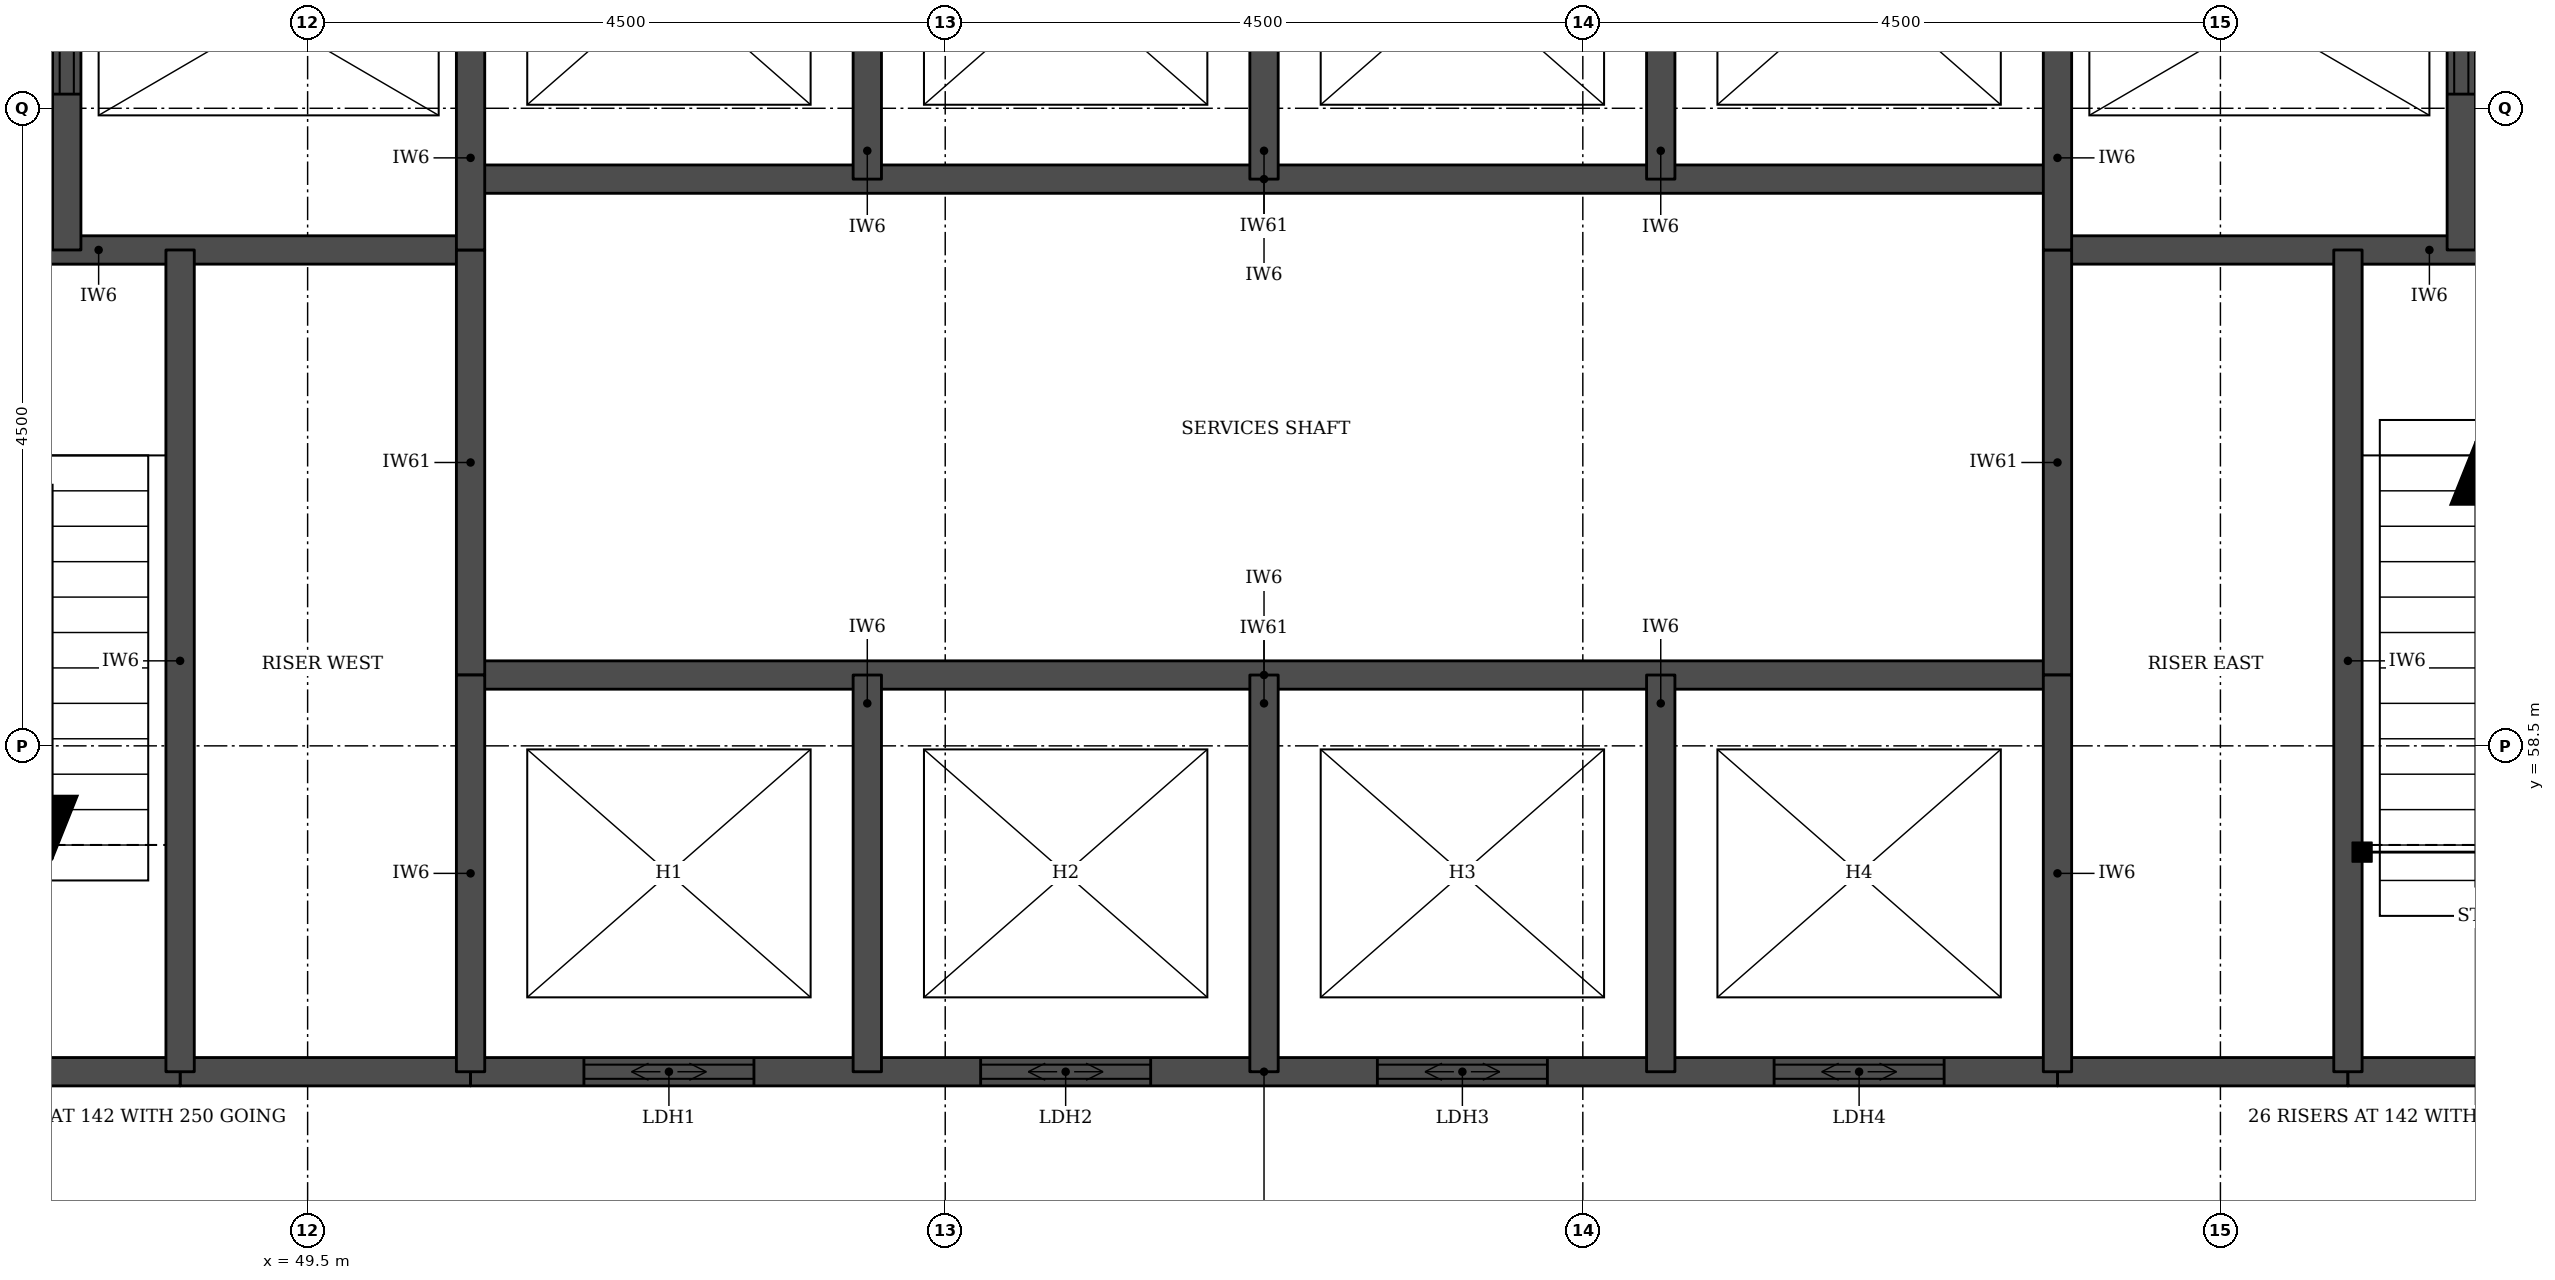
"""IFC4 building model, lengths in metres.
Left out: names, types, materials, properties, quantities, classifications, styles, units other than length and angle.
Written with IfcOpenShell. Run it as: python <this file> out.ifc"""

import sys

from ifc_helpers import new_model, si_unit, direction, frame, frame_2d, origin, place, context, subcontext, project, spatial, rectangle, extrude, element, fill, save


model = new_model("IFC4")
c1 = context("Model", 3, precision=1e-05, world=origin(), true_north=direction((0.0, 1.0)))
c2 = subcontext(c1, "Body", "Model", "MODEL_VIEW")
j1 = project(units=[si_unit("LENGTHUNIT", "METRE"), si_unit("PLANEANGLEUNIT", "RADIAN")], contexts=[c1])
p1 = place(None, origin())
s1 = spatial("IfcSite", under=j1, at=p1, CompositionType="ELEMENT")
p2 = place(p1, origin())
s2 = spatial("IfcBuilding", under=s1, at=p2, CompositionType="ELEMENT")
p3 = place(p2, frame((0.0, 0.0, 248.9)))
s3 = spatial("IfcBuildingStorey", under=s2, at=p3, CompositionType="ELEMENT", Elevation=248.9)
for number, where, z_axis, x_axis in (
    (1, (48.6, 56.2, 0.0), (0.0, 0.0, 1.0), (1.0, 0.0, 0.0)),
    (2, (61.85, 56.2, 0.0), (0.0, 0.0, 1.0), (1.0, 0.0, 0.0)),
):
    element("IfcWall", number, at=place(p3, frame(where, z_axis=z_axis, x_axis=x_axis)), inside=s3, PredefinedType="SOLIDWALL", context=c2, shape_type="SweptSolid", body=[
        extrude(rectangle(XDim=2.05, YDim=0.2, at=frame_2d((1.025, 0.0))), origin(), (0.0, 0.0, 1.0), 3.55),
    ])
p4 = place(p3, frame((45.4, 56.2, 0.0), z_axis=(0.0, 0.0, 1.0), x_axis=(1.0, 0.0, 0.0)))
e3 = element("IfcWall", 3, at=p4, inside=s3, PredefinedType="SOLIDWALL", context=c2, shape_type="SweptSolid", body=[
    extrude(rectangle(XDim=3.2, YDim=0.2, at=frame_2d((1.6, 0.0))), origin(), (0.0, 0.0, 1.0), 3.55),
])
p5 = place(p3, frame((50.65, 56.2, 0.0), z_axis=(0.0, 0.0, 1.0), x_axis=(1.0, 0.0, 0.0)))
e4 = element("IfcWall", 4, at=p5, inside=s3, PredefinedType="SOLIDWALL", context=c2, shape_type="SweptSolid", body=[
    extrude(rectangle(XDim=11.2, YDim=0.2, at=frame_2d((5.6, 0.0))), origin(), (0.0, 0.0, 1.0), 3.55),
])
p6 = place(p5, frame((0.8, 0.0, 0.0)))
e5 = element("IfcOpeningElement", 5, at=p6, cuts=e4, PredefinedType="OPENING", context=c2, shape_type="SweptSolid", body=[
    extrude(rectangle(XDim=1.2, YDim=2.1, at=frame_2d((0.6, 1.05))), frame((0.0, 0.11, 0.0), z_axis=(0.0, -1.0, 0.0), x_axis=(1.0, 0.0, 0.0)), (0.0, 0.0, 1.0), 0.22),
])
p7 = place(p5, frame((3.6, 0.0, 0.0)))
e6 = element("IfcOpeningElement", 6, at=p7, cuts=e4, PredefinedType="OPENING", context=c2, shape_type="SweptSolid", body=[
    extrude(rectangle(XDim=1.2, YDim=2.1, at=frame_2d((0.6, 1.05))), frame((0.0, 0.11, 0.0), z_axis=(0.0, -1.0, 0.0), x_axis=(1.0, 0.0, 0.0)), (0.0, 0.0, 1.0), 0.22),
])
p8 = place(p5, frame((6.4, 0.0, 0.0)))
e7 = element("IfcOpeningElement", 7, at=p8, cuts=e4, PredefinedType="OPENING", context=c2, shape_type="SweptSolid", body=[
    extrude(rectangle(XDim=1.2, YDim=2.1, at=frame_2d((0.6, 1.05))), frame((0.0, 0.11, 0.0), z_axis=(0.0, -1.0, 0.0), x_axis=(1.0, 0.0, 0.0)), (0.0, 0.0, 1.0), 0.22),
])
p9 = place(p5, frame((9.2, 0.0, 0.0)))
e8 = element("IfcOpeningElement", 8, at=p9, cuts=e4, PredefinedType="OPENING", context=c2, shape_type="SweptSolid", body=[
    extrude(rectangle(XDim=1.2, YDim=2.1, at=frame_2d((0.6, 1.05))), frame((0.0, 0.11, 0.0), z_axis=(0.0, -1.0, 0.0), x_axis=(1.0, 0.0, 0.0)), (0.0, 0.0, 1.0), 0.22),
])
p10 = place(p3, frame((63.9, 56.2, 0.0), z_axis=(0.0, 0.0, 1.0), x_axis=(1.0, 0.0, 0.0)))
e9 = element("IfcWall", 9, at=p10, inside=s3, PredefinedType="SOLIDWALL", context=c2, shape_type="SweptSolid", body=[
    extrude(rectangle(XDim=3.2, YDim=0.2, at=frame_2d((1.6, 0.0))), origin(), (0.0, 0.0, 1.0), 3.55),
])
p11 = place(p3, frame((50.65, 59.0, 0.0), z_axis=(0.0, 0.0, 1.0), x_axis=(1.0, 0.0, 0.0)))
e10 = element("IfcWall", 10, at=p11, inside=s3, PredefinedType="SOLIDWALL", context=c2, shape_type="SweptSolid", body=[
    extrude(rectangle(XDim=11.2, YDim=0.2, at=frame_2d((5.6, 0.0))), origin(), (0.0, 0.0, 1.0), 3.7),
])
for number, where, z_axis, x_axis in (
    (11, (45.4, 62.0, 0.0), (0.0, 0.0, 1.0), (1.0, 0.0, 0.0)),
    (12, (61.85, 62.0, 0.0), (0.0, 0.0, 1.0), (1.0, 0.0, 0.0)),
):
    element("IfcWall", number, at=place(p3, frame(where, z_axis=z_axis, x_axis=x_axis)), inside=s3, PredefinedType="SOLIDWALL", context=c2, shape_type="SweptSolid", body=[
        extrude(rectangle(XDim=5.25, YDim=0.2, at=frame_2d((2.625, 0.0))), origin(), (0.0, 0.0, 1.0), 3.55),
    ])
p12 = place(p3, frame((50.65, 62.5, 0.0), z_axis=(0.0, 0.0, 1.0), x_axis=(1.0, 0.0, 0.0)))
e13 = element("IfcWall", 13, at=p12, inside=s3, PredefinedType="SOLIDWALL", context=c2, shape_type="SweptSolid", body=[
    extrude(rectangle(XDim=11.2, YDim=0.2, at=frame_2d((5.6, 0.0))), origin(), (0.0, 0.0, 1.0), 3.7),
])
p13 = place(p3, frame((47.8, 62.0, 0.0), z_axis=(0.0, 0.0, 1.0), x_axis=(0.0, 1.0, 0.0)))
e14 = element("IfcWall", 14, at=p13, inside=s3, PredefinedType="SOLIDWALL", context=c2, shape_type="SweptSolid", body=[
    extrude(rectangle(XDim=3.3, YDim=0.2, at=frame_2d((1.65, 0.0))), origin(), (0.0, 0.0, 1.0), 3.55),
])
p14 = place(p13, frame((1.1, 0.0, 0.0)))
e15 = element("IfcOpeningElement", 15, at=p14, cuts=e14, PredefinedType="OPENING", context=c2, shape_type="SweptSolid", body=[
    extrude(rectangle(XDim=1.1, YDim=2.1, at=frame_2d((0.55, 1.05))), frame((0.0, 0.11, 0.0), z_axis=(0.0, -1.0, 0.0), x_axis=(1.0, 0.0, 0.0)), (0.0, 0.0, 1.0), 0.22),
])
p15 = place(p3, frame((48.6, 56.2, 0.0), z_axis=(0.0, 0.0, 1.0), x_axis=(0.0, 1.0, 0.0)))
e16 = element("IfcWall", 16, at=p15, inside=s3, PredefinedType="SOLIDWALL", context=c2, shape_type="SweptSolid", body=[
    extrude(rectangle(XDim=5.8, YDim=0.2, at=frame_2d((2.9, 0.0))), origin(), (0.0, 0.0, 1.0), 3.55),
])
p16 = place(p3, frame((50.65, 59.0, 0.0), z_axis=(0.0, 0.0, 1.0), x_axis=(0.0, 1.0, 0.0)))
e17 = element("IfcWall", 17, at=p16, inside=s3, PredefinedType="SOLIDWALL", context=c2, shape_type="SweptSolid", body=[
    extrude(rectangle(XDim=3.0, YDim=0.2, at=frame_2d((1.5, 0.0))), origin(), (0.0, 0.0, 1.0), 3.7),
])
p17 = place(p3, frame((50.65, 56.2, 0.0), z_axis=(0.0, 0.0, 1.0), x_axis=(0.0, 1.0, 0.0)))
e18 = element("IfcWall", 18, at=p17, inside=s3, PredefinedType="SOLIDWALL", context=c2, shape_type="SweptSolid", body=[
    extrude(rectangle(XDim=2.8, YDim=0.2, at=frame_2d((1.4, 0.0))), origin(), (0.0, 0.0, 1.0), 3.55),
])
p18 = place(p3, frame((50.65, 62.0, 0.0), z_axis=(0.0, 0.0, 1.0), x_axis=(0.0, 1.0, 0.0)))
e19 = element("IfcWall", 19, at=p18, inside=s3, PredefinedType="SOLIDWALL", context=c2, shape_type="SweptSolid", body=[
    extrude(rectangle(XDim=3.3, YDim=0.2, at=frame_2d((1.65, 0.0))), origin(), (0.0, 0.0, 1.0), 3.55),
])
for number, where, z_axis, x_axis in (
    (20, (53.45, 56.2, 0.0), (0.0, 0.0, 1.0), (0.0, 1.0, 0.0)),
    (21, (53.45, 62.5, 0.0), (0.0, 0.0, 1.0), (0.0, 1.0, 0.0)),
    (22, (56.25, 56.2, 0.0), (0.0, 0.0, 1.0), (0.0, 1.0, 0.0)),
    (23, (56.25, 62.5, 0.0), (0.0, 0.0, 1.0), (0.0, 1.0, 0.0)),
    (24, (59.05, 56.2, 0.0), (0.0, 0.0, 1.0), (0.0, 1.0, 0.0)),
    (25, (59.05, 62.5, 0.0), (0.0, 0.0, 1.0), (0.0, 1.0, 0.0)),
):
    element("IfcWall", number, at=place(p3, frame(where, z_axis=z_axis, x_axis=x_axis)), inside=s3, PredefinedType="SOLIDWALL", context=c2, shape_type="SweptSolid", body=[
        extrude(rectangle(XDim=2.8, YDim=0.2, at=frame_2d((1.4, 0.0))), origin(), (0.0, 0.0, 1.0), 3.55),
    ])
p19 = place(p3, frame((61.85, 59.0, 0.0), z_axis=(0.0, 0.0, 1.0), x_axis=(0.0, 1.0, 0.0)))
e26 = element("IfcWall", 26, at=p19, inside=s3, PredefinedType="SOLIDWALL", context=c2, shape_type="SweptSolid", body=[
    extrude(rectangle(XDim=3.0, YDim=0.2, at=frame_2d((1.5, 0.0))), origin(), (0.0, 0.0, 1.0), 3.7),
])
p20 = place(p3, frame((61.85, 56.2, 0.0), z_axis=(0.0, 0.0, 1.0), x_axis=(0.0, 1.0, 0.0)))
e27 = element("IfcWall", 27, at=p20, inside=s3, PredefinedType="SOLIDWALL", context=c2, shape_type="SweptSolid", body=[
    extrude(rectangle(XDim=2.8, YDim=0.2, at=frame_2d((1.4, 0.0))), origin(), (0.0, 0.0, 1.0), 3.55),
])
p21 = place(p3, frame((61.85, 62.0, 0.0), z_axis=(0.0, 0.0, 1.0), x_axis=(0.0, 1.0, 0.0)))
e28 = element("IfcWall", 28, at=p21, inside=s3, PredefinedType="SOLIDWALL", context=c2, shape_type="SweptSolid", body=[
    extrude(rectangle(XDim=3.3, YDim=0.2, at=frame_2d((1.65, 0.0))), origin(), (0.0, 0.0, 1.0), 3.55),
])
p22 = place(p3, frame((63.9, 56.2, 0.0), z_axis=(0.0, 0.0, 1.0), x_axis=(0.0, 1.0, 0.0)))
e29 = element("IfcWall", 29, at=p22, inside=s3, PredefinedType="SOLIDWALL", context=c2, shape_type="SweptSolid", body=[
    extrude(rectangle(XDim=5.8, YDim=0.2, at=frame_2d((2.9, 0.0))), origin(), (0.0, 0.0, 1.0), 3.55),
])
p23 = place(p3, frame((64.7, 62.0, 0.0), z_axis=(0.0, 0.0, 1.0), x_axis=(0.0, 1.0, 0.0)))
e30 = element("IfcWall", 30, at=p23, inside=s3, PredefinedType="SOLIDWALL", context=c2, shape_type="SweptSolid", body=[
    extrude(rectangle(XDim=3.3, YDim=0.2, at=frame_2d((1.65, 0.0))), origin(), (0.0, 0.0, 1.0), 3.55),
])
p24 = place(p23, frame((1.1, 0.0, 0.0)))
e31 = element("IfcOpeningElement", 31, at=p24, cuts=e30, PredefinedType="OPENING", context=c2, shape_type="SweptSolid", body=[
    extrude(rectangle(XDim=1.1, YDim=2.1, at=frame_2d((0.55, 1.05))), frame((0.0, 0.11, 0.0), z_axis=(0.0, -1.0, 0.0), x_axis=(1.0, 0.0, 0.0)), (0.0, 0.0, 1.0), 0.22),
])
p25 = place(p6, origin())
e32 = element("IfcDoor", 32, at=p25, inside=s3, OperationType="DOUBLE_DOOR_SLIDING", PredefinedType="DOOR", context=c2, shape_type="SweptSolid", body=[
    extrude(rectangle(XDim=1.2, YDim=2.1, at=frame_2d((0.6, 1.05))), frame((0.0, 0.025, 0.0), z_axis=(0.0, -1.0, 0.0), x_axis=(1.0, 0.0, 0.0)), (0.0, 0.0, 1.0), 0.05),
])
fill(e5, e32)
p26 = place(p7, origin())
e33 = element("IfcDoor", 33, at=p26, inside=s3, OperationType="DOUBLE_DOOR_SLIDING", PredefinedType="DOOR", context=c2, shape_type="SweptSolid", body=[
    extrude(rectangle(XDim=1.2, YDim=2.1, at=frame_2d((0.6, 1.05))), frame((0.0, 0.025, 0.0), z_axis=(0.0, -1.0, 0.0), x_axis=(1.0, 0.0, 0.0)), (0.0, 0.0, 1.0), 0.05),
])
fill(e6, e33)
p27 = place(p8, origin())
e34 = element("IfcDoor", 34, at=p27, inside=s3, OperationType="DOUBLE_DOOR_SLIDING", PredefinedType="DOOR", context=c2, shape_type="SweptSolid", body=[
    extrude(rectangle(XDim=1.2, YDim=2.1, at=frame_2d((0.6, 1.05))), frame((0.0, 0.025, 0.0), z_axis=(0.0, -1.0, 0.0), x_axis=(1.0, 0.0, 0.0)), (0.0, 0.0, 1.0), 0.05),
])
fill(e7, e34)
p28 = place(p9, origin())
e35 = element("IfcDoor", 35, at=p28, inside=s3, OperationType="DOUBLE_DOOR_SLIDING", PredefinedType="DOOR", context=c2, shape_type="SweptSolid", body=[
    extrude(rectangle(XDim=1.2, YDim=2.1, at=frame_2d((0.6, 1.05))), frame((0.0, 0.025, 0.0), z_axis=(0.0, -1.0, 0.0), x_axis=(1.0, 0.0, 0.0)), (0.0, 0.0, 1.0), 0.05),
])
fill(e8, e35)
p29 = place(p14, origin())
e36 = element("IfcDoor", 36, at=p29, inside=s3, OperationType="DOUBLE_DOOR_SLIDING", PredefinedType="DOOR", context=c2, shape_type="SweptSolid", body=[
    extrude(rectangle(XDim=1.1, YDim=2.1, at=frame_2d((0.55, 1.05))), frame((0.0, 0.025, 0.0), z_axis=(0.0, -1.0, 0.0), x_axis=(1.0, 0.0, 0.0)), (0.0, 0.0, 1.0), 0.05),
])
fill(e15, e36)
p30 = place(p24, origin())
e37 = element("IfcDoor", 37, at=p30, inside=s3, OperationType="DOUBLE_DOOR_SLIDING", PredefinedType="DOOR", context=c2, shape_type="SweptSolid", body=[
    extrude(rectangle(XDim=1.1, YDim=2.1, at=frame_2d((0.55, 1.05))), frame((0.0, 0.025, 0.0), z_axis=(0.0, -1.0, 0.0), x_axis=(1.0, 0.0, 0.0)), (0.0, 0.0, 1.0), 0.05),
])
fill(e31, e37)
save(model, sys.argv[1])
